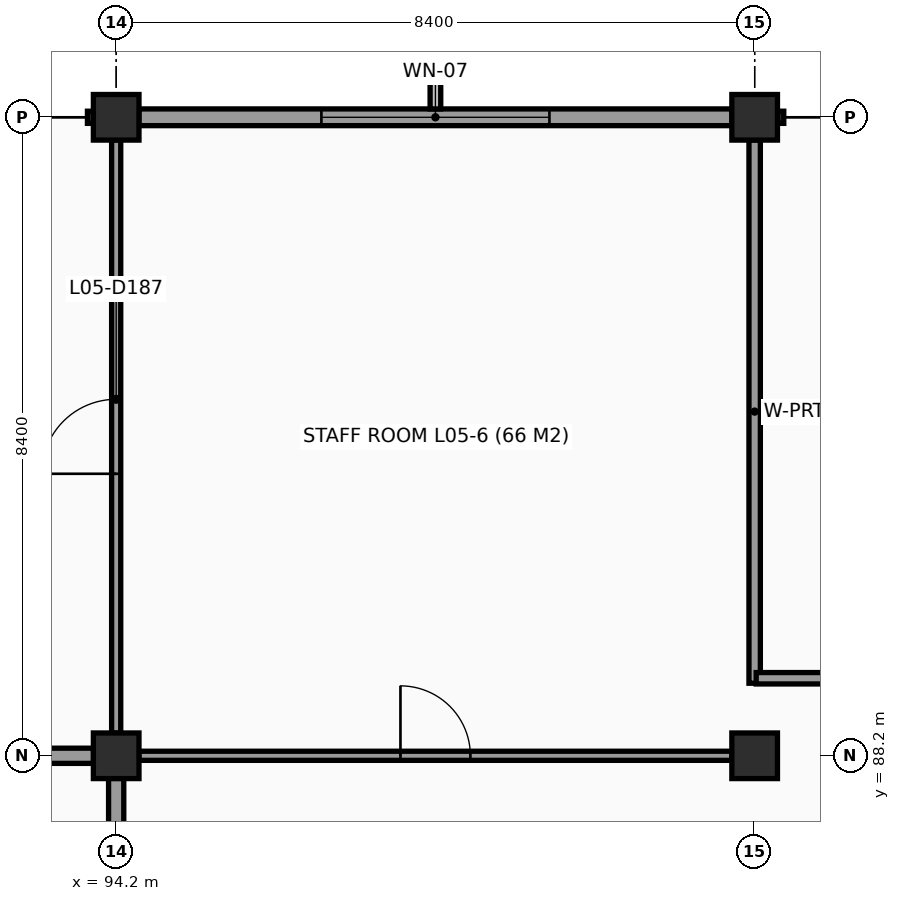
"""IFC4 building model, lengths in metres.
Left out: names, types, materials, properties, quantities, classifications, styles, units other than length and angle.
Written with IfcOpenShell. Run it as: python <this file> out.ifc"""

import sys

from ifc_helpers import new_model, si_unit, direction, frame, frame_2d, origin, origin_2d, place, context, subcontext, project, spatial, rectangle, extrude, element, fill, save


model = new_model("IFC4")
c1 = context("Model", 3, precision=1e-05, world=origin(), true_north=direction((0.0, 1.0)))
c2 = subcontext(c1, "Body", "Model", "MODEL_VIEW")
j1 = project(units=[si_unit("LENGTHUNIT", "METRE"), si_unit("PLANEANGLEUNIT", "RADIAN")], contexts=[c1])
p1 = place(None, origin())
s1 = spatial("IfcSite", under=j1, at=p1, CompositionType="ELEMENT")
p2 = place(p1, origin())
s2 = spatial("IfcBuilding", under=s1, at=p2, CompositionType="ELEMENT")
p3 = place(p2, frame((0.0, 0.0, 18.6)))
s3 = spatial("IfcBuildingStorey", under=s2, at=p3, CompositionType="ELEMENT", Elevation=18.6)
for number, where, z_axis, x_axis in (
    (1, (94.2, 88.2, 0.0), (0.0, 0.0, 1.0), (1.0, 0.0, 0.0)),
    (2, (94.2, 96.6, 0.0), (0.0, 0.0, 1.0), (1.0, 0.0, 0.0)),
    (3, (102.6, 88.2, 0.0), (0.0, 0.0, 1.0), (1.0, 0.0, 0.0)),
    (4, (102.6, 96.6, 0.0), (0.0, 0.0, 1.0), (1.0, 0.0, 0.0)),
):
    element("IfcColumn", number, at=place(p3, frame(where, z_axis=z_axis, x_axis=x_axis)), inside=s3, PredefinedType="COLUMN", context=c2, shape_type="SweptSolid", body=[
        extrude(rectangle(XDim=0.6, YDim=0.6, at=origin_2d()), origin(), (0.0, 0.0, 1.0), 3.6),
    ])
p4 = place(p3, frame((94.498, 96.6, 0.0), z_axis=(0.0, 0.0, 1.0), x_axis=(1.0, 0.0, 0.0)))
e5 = element("IfcWall", 5, at=p4, inside=s3, PredefinedType="SOLIDWALL", context=c2, shape_type="SweptSolid", body=[
    extrude(rectangle(XDim=7.804, YDim=0.22, at=frame_2d((3.902, 0.0))), origin(), (0.0, 0.0, 1.0), 2.65),
])
p5 = place(p4, frame((2.402, 0.0, 0.95)))
e6 = element("IfcOpeningElement", 6, at=p5, cuts=e5, PredefinedType="OPENING", context=c2, shape_type="SweptSolid", body=[
    extrude(rectangle(XDim=3.0, YDim=1.2, at=frame_2d((1.5, 0.6))), frame((0.0, 0.12, 0.0), z_axis=(0.0, -1.0, 0.0), x_axis=(1.0, 0.0, 0.0)), (0.0, 0.0, 1.0), 0.24),
])
p6 = place(p3, frame((90.02, 88.2, 0.0), z_axis=(0.0, 0.0, 1.0), x_axis=(1.0, 0.0, 0.0)))
e7 = element("IfcWall", 7, at=p6, inside=s3, PredefinedType="PARTITIONING", context=c2, shape_type="SweptSolid", body=[
    extrude(rectangle(XDim=3.882, YDim=0.2, at=frame_2d((1.941, 0.0))), origin(), (0.0, 0.0, 1.0), 2.9),
])
p7 = place(p3, frame((94.2, 87.902, 0.0), z_axis=(0.0, 0.0, 1.0), x_axis=(0.0, -1.0, 0.0)))
e8 = element("IfcWall", 8, at=p7, inside=s3, PredefinedType="PARTITIONING", context=c2, shape_type="SweptSolid", body=[
    extrude(rectangle(XDim=3.282, YDim=0.2, at=frame_2d((1.641, 0.0))), origin(), (0.0, 0.0, 1.0), 2.99),
])
p8 = place(p7, frame((0.691, 0.0, 0.0)))
e9 = element("IfcOpeningElement", 9, at=p8, cuts=e8, PredefinedType="OPENING", context=c2, shape_type="SweptSolid", body=[
    extrude(rectangle(XDim=1.9, YDim=2.3, at=frame_2d((0.95, 1.15))), frame((0.0, 0.11, 0.0), z_axis=(0.0, -1.0, 0.0), x_axis=(1.0, 0.0, 0.0)), (0.0, 0.0, 1.0), 0.22),
])
p9 = place(p3, frame((94.2, 96.302, 0.0), z_axis=(0.0, 0.0, 1.0), x_axis=(0.0, -1.0, 0.0)))
e10 = element("IfcWall", 10, at=p9, inside=s3, PredefinedType="PARTITIONING", context=c2, shape_type="SweptSolid", body=[
    extrude(rectangle(XDim=7.804, YDim=0.12, at=frame_2d((3.902, 0.0))), origin(), (0.0, 0.0, 1.0), 2.99),
])
p10 = place(p9, frame((3.412, 0.0, 0.0)))
e11 = element("IfcOpeningElement", 11, at=p10, cuts=e10, PredefinedType="OPENING", context=c2, shape_type="SweptSolid", body=[
    extrude(rectangle(XDim=0.98, YDim=2.12, at=frame_2d((0.49, 1.06))), frame((0.0, 0.07, 0.0), z_axis=(0.0, -1.0, 0.0), x_axis=(1.0, 0.0, 0.0)), (0.0, 0.0, 1.0), 0.14),
])
p11 = place(p3, frame((102.302, 88.2, 0.0), z_axis=(0.0, 0.0, 1.0), x_axis=(-1.0, 0.0, 0.0)))
e12 = element("IfcWall", 12, at=p11, inside=s3, PredefinedType="PARTITIONING", context=c2, shape_type="SweptSolid", body=[
    extrude(rectangle(XDim=7.804, YDim=0.12, at=frame_2d((3.902, 0.0))), origin(), (0.0, 0.0, 1.0), 2.9),
])
p12 = place(p11, frame((3.442, 0.0, 0.0)))
e13 = element("IfcOpeningElement", 13, at=p12, cuts=e12, PredefinedType="OPENING", context=c2, shape_type="SweptSolid", body=[
    extrude(rectangle(XDim=0.92, YDim=2.1, at=frame_2d((0.46, 1.05))), frame((0.0, 0.07, 0.0), z_axis=(0.0, -1.0, 0.0), x_axis=(1.0, 0.0, 0.0)), (0.0, 0.0, 1.0), 0.14),
])
p13 = place(p3, frame((102.6, 96.302, 0.0), z_axis=(0.0, 0.0, 1.0), x_axis=(0.0, -1.0, 0.0)))
e14 = element("IfcWall", 14, at=p13, inside=s3, PredefinedType="PARTITIONING", context=c2, shape_type="SweptSolid", body=[
    extrude(rectangle(XDim=7.147, YDim=0.15, at=frame_2d((3.574, 0.0))), origin(), (0.0, 0.0, 1.0), 2.7),
])
p14 = place(p3, frame((104.652, 89.22, 0.0), z_axis=(0.0, 0.0, 1.0), x_axis=(-1.0, 0.0, 0.0)))
e15 = element("IfcWall", 15, at=p14, inside=s3, PredefinedType="PARTITIONING", context=c2, shape_type="SweptSolid", body=[
    extrude(rectangle(XDim=2.032, YDim=0.15, at=frame_2d((1.016, 0.0))), origin(), (0.0, 0.0, 1.0), 2.7),
])
p15 = place(p5, origin())
e16 = element("IfcWindow", 16, at=p15, inside=s3, PartitioningType="SINGLE_PANEL", PredefinedType="WINDOW", context=c2, shape_type="SweptSolid", body=[
    extrude(rectangle(XDim=3.0, YDim=1.2, at=frame_2d((1.5, 0.6))), frame((0.0, 0.03, 0.0), z_axis=(0.0, -1.0, 0.0), x_axis=(1.0, 0.0, 0.0)), (0.0, 0.0, 1.0), 0.06),
])
fill(e6, e16)
p16 = place(p10, origin())
e17 = element("IfcDoor", 17, at=p16, inside=s3, OperationType="SINGLE_SWING_RIGHT", PredefinedType="DOOR", context=c2, shape_type="SweptSolid", body=[
    extrude(rectangle(XDim=0.98, YDim=2.12, at=frame_2d((0.49, 1.06))), frame((0.0, 0.025, 0.0), z_axis=(0.0, -1.0, 0.0), x_axis=(1.0, 0.0, 0.0)), (0.0, 0.0, 1.0), 0.05),
])
fill(e11, e17)
p17 = place(p12, origin())
e18 = element("IfcDoor", 18, at=p17, inside=s3, OperationType="SINGLE_SWING_RIGHT", PredefinedType="DOOR", context=c2, shape_type="SweptSolid", body=[
    extrude(rectangle(XDim=0.92, YDim=2.1, at=frame_2d((0.46, 1.05))), frame((0.0, 0.025, 0.0), z_axis=(0.0, -1.0, 0.0), x_axis=(1.0, 0.0, 0.0)), (0.0, 0.0, 1.0), 0.05),
])
fill(e13, e18)
save(model, sys.argv[1])
